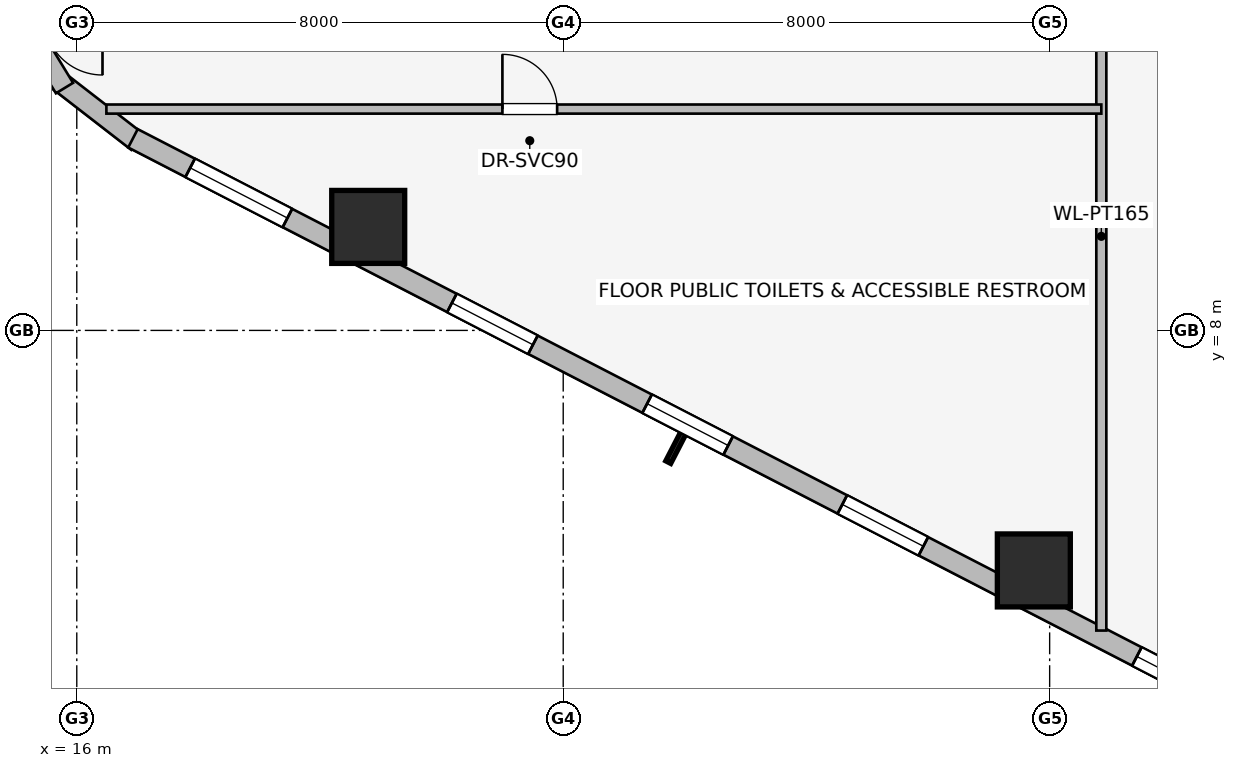
"""IFC4 building model, lengths in metres.
Left out: names, types, materials, properties, quantities, classifications, styles, units other than length and angle.
Written with IfcOpenShell. Run it as: python <this file> out.ifc"""

import sys

from ifc_helpers import new_model, si_unit, direction, frame, frame_2d, origin, origin_2d, place, context, subcontext, project, spatial, rectangle, extrude, element, fill, save


model = new_model("IFC4")
c1 = context("Model", 3, precision=1e-05, world=origin(), true_north=direction((0.0, 1.0)))
c2 = subcontext(c1, "Body", "Model", "MODEL_VIEW")
j1 = project(units=[si_unit("LENGTHUNIT", "METRE"), si_unit("PLANEANGLEUNIT", "RADIAN")], contexts=[c1])
p1 = place(None, origin())
s1 = spatial("IfcSite", under=j1, at=p1, CompositionType="ELEMENT")
p2 = place(p1, origin())
s2 = spatial("IfcBuilding", under=s1, at=p2, CompositionType="ELEMENT")
p3 = place(p2, frame((0.0, 0.0, 48.9)))
s3 = spatial("IfcBuildingStorey", under=s2, at=p3, CompositionType="ELEMENT", Elevation=48.9)
for number, where, z_axis, x_axis in (
    (1, (20.793, 9.702, 0.0), (0.0, 0.0, 1.0), (1.0, 0.0, 0.0)),
    (2, (31.74, 4.053, 0.0), (0.0, 0.0, 1.0), (1.0, 0.0, 0.0)),
):
    element("IfcColumn", number, at=place(p3, frame(where, z_axis=z_axis, x_axis=x_axis)), inside=s3, PredefinedType="COLUMN", context=c2, shape_type="SweptSolid", body=[
        extrude(rectangle(XDim=1.2, YDim=1.2, at=origin_2d()), origin(), (0.0, 0.0, 1.0), 3.65),
    ])
p4 = place(p3, frame((16.998, 11.099, 0.0), z_axis=(0.0, 0.0, 1.0), x_axis=(-0.790691856293, 0.61221433207, 0.0)))
e3 = element("IfcWall", 3, at=p4, inside=s3, PredefinedType="STANDARD", context=c2, shape_type="SweptSolid", body=[
    extrude(rectangle(XDim=1.676, YDim=0.33, at=frame_2d((0.838, 0.0))), origin(), (0.0, 0.0, 1.0), 3.36),
])
p5 = place(p3, frame((15.798, 11.985, 0.0), z_axis=(0.0, 0.0, 1.0), x_axis=(-0.520584129191, 0.853810379671, 0.0)))
e4 = element("IfcWall", 4, at=p5, inside=s3, PredefinedType="STANDARD", context=c2, shape_type="SweptSolid", body=[
    extrude(rectangle(XDim=1.677, YDim=0.33, at=frame_2d((0.838, 0.0))), origin(), (0.0, 0.0, 1.0), 3.36),
])
p6 = place(p3, frame((35.169, 1.743, 0.0), z_axis=(0.0, 0.0, 1.0), x_axis=(-0.888634413993, 0.458616264721, 0.0)))
e5 = element("IfcWall", 5, at=p6, inside=s3, PredefinedType="STANDARD", context=c2, shape_type="SweptSolid", body=[
    extrude(rectangle(XDim=20.531, YDim=0.34, at=frame_2d((10.266, 0.0))), origin(), (0.0, 0.0, 1.0), 2.654),
])
p7 = place(p6, frame((0.902, 0.0, 0.75)))
e6 = element("IfcOpeningElement", 6, at=p7, cuts=e5, PredefinedType="OPENING", context=c2, shape_type="SweptSolid", body=[
    extrude(rectangle(XDim=1.05, YDim=1.4, at=frame_2d((0.525, 0.7))), frame((0.0, 0.18, 0.0), z_axis=(0.0, -1.0, 0.0), x_axis=(1.0, 0.0, 0.0)), (0.0, 0.0, 1.0), 0.36),
])
p8 = place(p6, frame((5.903, 0.0, 0.75)))
e7 = element("IfcOpeningElement", 7, at=p8, cuts=e5, PredefinedType="OPENING", context=c2, shape_type="SweptSolid", body=[
    extrude(rectangle(XDim=1.5, YDim=1.5, at=frame_2d((0.75, 0.75))), frame((0.0, 0.18, 0.0), z_axis=(0.0, -1.0, 0.0), x_axis=(1.0, 0.0, 0.0)), (0.0, 0.0, 1.0), 0.36),
])
p9 = place(p6, frame((9.516, 0.0, 0.75)))
e8 = element("IfcOpeningElement", 8, at=p9, cuts=e5, PredefinedType="OPENING", context=c2, shape_type="SweptSolid", body=[
    extrude(rectangle(XDim=1.5, YDim=1.5, at=frame_2d((0.75, 0.75))), frame((0.0, 0.18, 0.0), z_axis=(0.0, -1.0, 0.0), x_axis=(1.0, 0.0, 0.0)), (0.0, 0.0, 1.0), 0.36),
])
p10 = place(p6, frame((13.129, 0.0, 0.75)))
e9 = element("IfcOpeningElement", 9, at=p10, cuts=e5, PredefinedType="OPENING", context=c2, shape_type="SweptSolid", body=[
    extrude(rectangle(XDim=1.5, YDim=1.5, at=frame_2d((0.75, 0.75))), frame((0.0, 0.18, 0.0), z_axis=(0.0, -1.0, 0.0), x_axis=(1.0, 0.0, 0.0)), (0.0, 0.0, 1.0), 0.36),
])
p11 = place(p6, frame((17.673, 0.0, 0.75)))
e10 = element("IfcOpeningElement", 10, at=p11, cuts=e5, PredefinedType="OPENING", context=c2, shape_type="SweptSolid", body=[
    extrude(rectangle(XDim=1.8, YDim=1.5, at=frame_2d((0.9, 0.75))), frame((0.0, 0.18, 0.0), z_axis=(0.0, -1.0, 0.0), x_axis=(1.0, 0.0, 0.0)), (0.0, 0.0, 1.0), 0.36),
])
p12 = place(p3, frame((32.85, 3.064, 0.0), z_axis=(0.0, 0.0, 1.0), x_axis=(0.0, 1.0, 0.0)))
e11 = element("IfcWall", 11, at=p12, inside=s3, PredefinedType="PARTITIONING", context=c2, shape_type="SweptSolid", body=[
    extrude(rectangle(XDim=12.966, YDim=0.165, at=frame_2d((6.483, 0.0))), origin(), (0.0, 0.0, 1.0), 3.36),
])
p13 = place(p3, frame((16.487, 11.64, 0.0), z_axis=(0.0, 0.0, 1.0), x_axis=(1.0, 0.0, 0.0)))
e12 = element("IfcWall", 12, at=p13, inside=s3, PredefinedType="PARTITIONING", context=c2, shape_type="SweptSolid", body=[
    extrude(rectangle(XDim=16.363, YDim=0.15, at=frame_2d((8.182, 0.0))), origin(), (0.0, 0.0, 1.0), 3.36),
])
p14 = place(p13, frame((6.513, 0.0, 0.0)))
e13 = element("IfcOpeningElement", 13, at=p14, cuts=e12, PredefinedType="OPENING", context=c2, shape_type="SweptSolid", body=[
    extrude(rectangle(XDim=0.9, YDim=2.0, at=frame_2d((0.45, 1.0))), frame((0.0, 0.085, 0.0), z_axis=(0.0, -1.0, 0.0), x_axis=(1.0, 0.0, 0.0)), (0.0, 0.0, 1.0), 0.17),
])
p15 = place(p7, origin())
e14 = element("IfcWindow", 14, at=p15, inside=s3, PartitioningType="SINGLE_PANEL", PredefinedType="WINDOW", context=c2, shape_type="SweptSolid", body=[
    extrude(rectangle(XDim=1.05, YDim=1.4, at=frame_2d((0.525, 0.7))), frame((0.0, 0.03, 0.0), z_axis=(0.0, -1.0, 0.0), x_axis=(1.0, 0.0, 0.0)), (0.0, 0.0, 1.0), 0.06),
])
fill(e6, e14)
p16 = place(p8, origin())
e15 = element("IfcWindow", 15, at=p16, inside=s3, PartitioningType="SINGLE_PANEL", PredefinedType="WINDOW", context=c2, shape_type="SweptSolid", body=[
    extrude(rectangle(XDim=1.5, YDim=1.5, at=frame_2d((0.75, 0.75))), frame((0.0, 0.03, 0.0), z_axis=(0.0, -1.0, 0.0), x_axis=(1.0, 0.0, 0.0)), (0.0, 0.0, 1.0), 0.06),
])
fill(e7, e15)
p17 = place(p9, origin())
e16 = element("IfcWindow", 16, at=p17, inside=s3, PartitioningType="SINGLE_PANEL", PredefinedType="WINDOW", context=c2, shape_type="SweptSolid", body=[
    extrude(rectangle(XDim=1.5, YDim=1.5, at=frame_2d((0.75, 0.75))), frame((0.0, 0.03, 0.0), z_axis=(0.0, -1.0, 0.0), x_axis=(1.0, 0.0, 0.0)), (0.0, 0.0, 1.0), 0.06),
])
fill(e8, e16)
p18 = place(p10, origin())
e17 = element("IfcWindow", 17, at=p18, inside=s3, PartitioningType="SINGLE_PANEL", PredefinedType="WINDOW", context=c2, shape_type="SweptSolid", body=[
    extrude(rectangle(XDim=1.5, YDim=1.5, at=frame_2d((0.75, 0.75))), frame((0.0, 0.03, 0.0), z_axis=(0.0, -1.0, 0.0), x_axis=(1.0, 0.0, 0.0)), (0.0, 0.0, 1.0), 0.06),
])
fill(e9, e17)
p19 = place(p11, origin())
e18 = element("IfcWindow", 18, at=p19, inside=s3, PartitioningType="SINGLE_PANEL", PredefinedType="WINDOW", context=c2, shape_type="SweptSolid", body=[
    extrude(rectangle(XDim=1.8, YDim=1.5, at=frame_2d((0.9, 0.75))), frame((0.0, 0.03, 0.0), z_axis=(0.0, -1.0, 0.0), x_axis=(1.0, 0.0, 0.0)), (0.0, 0.0, 1.0), 0.06),
])
fill(e10, e18)
p20 = place(p14, origin())
e19 = element("IfcDoor", 19, at=p20, inside=s3, OperationType="SINGLE_SWING_LEFT", PredefinedType="DOOR", context=c2, shape_type="SweptSolid", body=[
    extrude(rectangle(XDim=0.9, YDim=2.0, at=frame_2d((0.45, 1.0))), frame((0.0, 0.025, 0.0), z_axis=(0.0, -1.0, 0.0), x_axis=(1.0, 0.0, 0.0)), (0.0, 0.0, 1.0), 0.05),
])
fill(e13, e19)
save(model, sys.argv[1])
